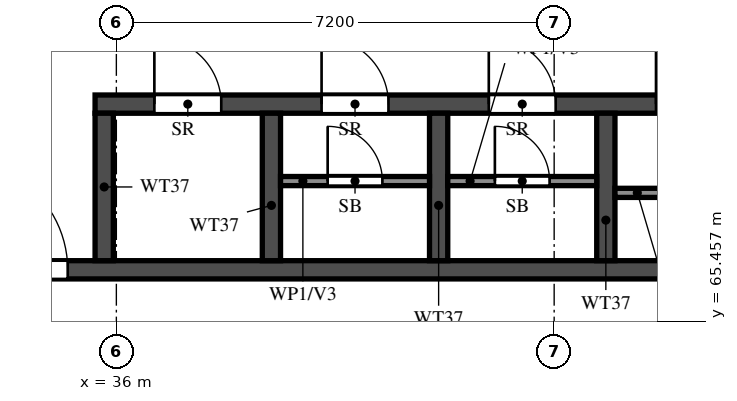
"""IFC4 building model, lengths in metres.
Left out: names, types, materials, properties, quantities, classifications, styles, units other than length and angle.
Written with IfcOpenShell. Run it as: python <this file> out.ifc"""

import sys

from ifc_helpers import new_model, si_unit, direction, frame, frame_2d, origin, place, context, subcontext, project, spatial, rectangle, extrude, element, fill, save


model = new_model("IFC4")
c1 = context("Model", 3, precision=1e-05, world=origin(), true_north=direction((0.0, 1.0)))
c2 = subcontext(c1, "Body", "Model", "MODEL_VIEW")
j1 = project(units=[si_unit("LENGTHUNIT", "METRE"), si_unit("PLANEANGLEUNIT", "RADIAN")], contexts=[c1])
p1 = place(None, origin())
s1 = spatial("IfcSite", under=j1, at=p1, CompositionType="ELEMENT")
p2 = place(p1, origin())
s2 = spatial("IfcBuilding", under=s1, at=p2, CompositionType="ELEMENT")
p3 = place(p2, frame((0.0, 0.0, 253.5)))
s3 = spatial("IfcBuildingStorey", under=s2, at=p3, CompositionType="ELEMENT", Elevation=253.5)
p4 = place(p3, frame((29.2, 66.3, 0.0), z_axis=(0.0, 0.0, 1.0), x_axis=(1.0, 0.0, 0.0)))
e1 = element("IfcWall", 1, at=p4, inside=s3, PredefinedType="SHEAR", context=c2, shape_type="SweptSolid", body=[
    extrude(rectangle(XDim=42.4, YDim=0.3, at=frame_2d((21.2, 0.0))), origin(), (0.0, 0.0, 1.0), 3.22),
])
p5 = place(p4, frame((1.425, 0.0, 0.0)))
e2 = element("IfcOpeningElement", 2, at=p5, cuts=e1, PredefinedType="OPENING", context=c2, shape_type="SweptSolid", body=[
    extrude(rectangle(XDim=1.1, YDim=2.1, at=frame_2d((0.55, 1.05))), frame((0.0, 0.16, 0.0), z_axis=(0.0, -1.0, 0.0), x_axis=(1.0, 0.0, 0.0)), (0.0, 0.0, 1.0), 0.32),
])
p6 = place(p4, frame((4.2, 0.0, 0.0)))
e3 = element("IfcOpeningElement", 3, at=p6, cuts=e1, PredefinedType="OPENING", context=c2, shape_type="SweptSolid", body=[
    extrude(rectangle(XDim=1.8, YDim=2.1, at=frame_2d((0.9, 1.05))), frame((0.0, 0.16, 0.0), z_axis=(0.0, -1.0, 0.0), x_axis=(1.0, 0.0, 0.0)), (0.0, 0.0, 1.0), 0.32),
])
p7 = place(p3, frame((35.65, 69.025, 0.0), z_axis=(0.0, 0.0, 1.0), x_axis=(1.0, 0.0, 0.0)))
e4 = element("IfcWall", 4, at=p7, inside=s3, PredefinedType="SHEAR", context=c2, shape_type="SweptSolid", body=[
    extrude(rectangle(XDim=24.05, YDim=0.3, at=frame_2d((12.025, 0.0))), origin(), (0.0, 0.0, 1.0), 3.22),
])
p8 = place(p7, frame((0.975, 0.0, 0.0)))
e5 = element("IfcOpeningElement", 5, at=p8, cuts=e4, PredefinedType="OPENING", context=c2, shape_type="SweptSolid", body=[
    extrude(rectangle(XDim=1.1, YDim=2.1, at=frame_2d((0.55, 1.05))), frame((0.0, 0.16, 0.0), z_axis=(0.0, -1.0, 0.0), x_axis=(1.0, 0.0, 0.0)), (0.0, 0.0, 1.0), 0.32),
])
p9 = place(p7, frame((3.725, 0.0, 0.0)))
e6 = element("IfcOpeningElement", 6, at=p9, cuts=e4, PredefinedType="OPENING", context=c2, shape_type="SweptSolid", body=[
    extrude(rectangle(XDim=1.1, YDim=2.1, at=frame_2d((0.55, 1.05))), frame((0.0, 0.16, 0.0), z_axis=(0.0, -1.0, 0.0), x_axis=(1.0, 0.0, 0.0)), (0.0, 0.0, 1.0), 0.32),
])
p10 = place(p7, frame((6.475, 0.0, 0.0)))
e7 = element("IfcOpeningElement", 7, at=p10, cuts=e4, PredefinedType="OPENING", context=c2, shape_type="SweptSolid", body=[
    extrude(rectangle(XDim=1.1, YDim=2.1, at=frame_2d((0.55, 1.05))), frame((0.0, 0.16, 0.0), z_axis=(0.0, -1.0, 0.0), x_axis=(1.0, 0.0, 0.0)), (0.0, 0.0, 1.0), 0.32),
])
p11 = place(p7, frame((9.225, 0.0, 0.0)))
e8 = element("IfcOpeningElement", 8, at=p11, cuts=e4, PredefinedType="OPENING", context=c2, shape_type="SweptSolid", body=[
    extrude(rectangle(XDim=1.1, YDim=2.1, at=frame_2d((0.55, 1.05))), frame((0.0, 0.16, 0.0), z_axis=(0.0, -1.0, 0.0), x_axis=(1.0, 0.0, 0.0)), (0.0, 0.0, 1.0), 0.32),
])
p12 = place(p7, frame((11.975, 0.0, 0.0)))
e9 = element("IfcOpeningElement", 9, at=p12, cuts=e4, PredefinedType="OPENING", context=c2, shape_type="SweptSolid", body=[
    extrude(rectangle(XDim=1.1, YDim=2.1, at=frame_2d((0.55, 1.05))), frame((0.0, 0.16, 0.0), z_axis=(0.0, -1.0, 0.0), x_axis=(1.0, 0.0, 0.0)), (0.0, 0.0, 1.0), 0.32),
])
p13 = place(p7, frame((14.725, 0.0, 0.0)))
e10 = element("IfcOpeningElement", 10, at=p13, cuts=e4, PredefinedType="OPENING", context=c2, shape_type="SweptSolid", body=[
    extrude(rectangle(XDim=1.1, YDim=2.1, at=frame_2d((0.55, 1.05))), frame((0.0, 0.16, 0.0), z_axis=(0.0, -1.0, 0.0), x_axis=(1.0, 0.0, 0.0)), (0.0, 0.0, 1.0), 0.32),
])
p14 = place(p7, frame((17.6, 0.0, 0.0)))
e11 = element("IfcOpeningElement", 11, at=p14, cuts=e4, PredefinedType="OPENING", context=c2, shape_type="SweptSolid", body=[
    extrude(rectangle(XDim=1.1, YDim=2.1, at=frame_2d((0.55, 1.05))), frame((0.0, 0.16, 0.0), z_axis=(0.0, -1.0, 0.0), x_axis=(1.0, 0.0, 0.0)), (0.0, 0.0, 1.0), 0.32),
])
p15 = place(p7, frame((20.6, 0.0, 0.0)))
e12 = element("IfcOpeningElement", 12, at=p15, cuts=e4, PredefinedType="OPENING", context=c2, shape_type="SweptSolid", body=[
    extrude(rectangle(XDim=1.1, YDim=2.1, at=frame_2d((0.55, 1.05))), frame((0.0, 0.16, 0.0), z_axis=(0.0, -1.0, 0.0), x_axis=(1.0, 0.0, 0.0)), (0.0, 0.0, 1.0), 0.32),
])
for number, where, z_axis, x_axis in (
    (13, (35.8, 66.45, 0.0), (0.0, 0.0, 1.0), (0.0, 1.0, 0.0)),
    (14, (38.55, 66.45, 0.0), (0.0, 0.0, 1.0), (0.0, 1.0, 0.0)),
    (15, (41.3, 66.45, 0.0), (0.0, 0.0, 1.0), (0.0, 1.0, 0.0)),
    (16, (44.05, 66.45, 0.0), (0.0, 0.0, 1.0), (0.0, 1.0, 0.0)),
):
    element("IfcWall", number, at=place(p3, frame(where, z_axis=z_axis, x_axis=x_axis)), inside=s3, PredefinedType="SHEAR", context=c2, shape_type="SweptSolid", body=[
        extrude(rectangle(XDim=2.425, YDim=0.3, at=frame_2d((1.212, 0.0))), origin(), (0.0, 0.0, 1.0), 3.22),
    ])
p16 = place(p3, frame((38.7, 67.76, 0.0), z_axis=(0.0, 0.0, 1.0), x_axis=(1.0, 0.0, 0.0)))
e17 = element("IfcWall", 17, at=p16, inside=s3, PredefinedType="PARTITIONING", context=c2, shape_type="SweptSolid", body=[
    extrude(rectangle(XDim=2.45, YDim=0.15, at=frame_2d((1.225, 0.0))), origin(), (0.0, 0.0, 1.0), 3.22),
])
p17 = place(p16, frame((0.775, 0.0, 0.0)))
e18 = element("IfcOpeningElement", 18, at=p17, cuts=e17, PredefinedType="OPENING", context=c2, shape_type="SweptSolid", body=[
    extrude(rectangle(XDim=0.9, YDim=2.1, at=frame_2d((0.45, 1.05))), frame((0.0, 0.085, 0.0), z_axis=(0.0, -1.0, 0.0), x_axis=(1.0, 0.0, 0.0)), (0.0, 0.0, 1.0), 0.17),
])
p18 = place(p3, frame((41.45, 67.76, 0.0), z_axis=(0.0, 0.0, 1.0), x_axis=(1.0, 0.0, 0.0)))
e19 = element("IfcWall", 19, at=p18, inside=s3, PredefinedType="PARTITIONING", context=c2, shape_type="SweptSolid", body=[
    extrude(rectangle(XDim=2.45, YDim=0.15, at=frame_2d((1.225, 0.0))), origin(), (0.0, 0.0, 1.0), 3.22),
])
p19 = place(p18, frame((0.775, 0.0, 0.0)))
e20 = element("IfcOpeningElement", 20, at=p19, cuts=e19, PredefinedType="OPENING", context=c2, shape_type="SweptSolid", body=[
    extrude(rectangle(XDim=0.9, YDim=2.1, at=frame_2d((0.45, 1.05))), frame((0.0, 0.085, 0.0), z_axis=(0.0, -1.0, 0.0), x_axis=(1.0, 0.0, 0.0)), (0.0, 0.0, 1.0), 0.17),
])
p20 = place(p3, frame((44.2, 67.565, 0.0), z_axis=(0.0, 0.0, 1.0), x_axis=(1.0, 0.0, 0.0)))
e21 = element("IfcWall", 21, at=p20, inside=s3, PredefinedType="PARTITIONING", context=c2, shape_type="SweptSolid", body=[
    extrude(rectangle(XDim=2.45, YDim=0.15, at=frame_2d((1.225, 0.0))), origin(), (0.0, 0.0, 1.0), 3.22),
])
p21 = place(p20, frame((0.775, 0.0, 0.0)))
e22 = element("IfcOpeningElement", 22, at=p21, cuts=e21, PredefinedType="OPENING", context=c2, shape_type="SweptSolid", body=[
    extrude(rectangle(XDim=0.9, YDim=2.1, at=frame_2d((0.45, 1.05))), frame((0.0, 0.085, 0.0), z_axis=(0.0, -1.0, 0.0), x_axis=(1.0, 0.0, 0.0)), (0.0, 0.0, 1.0), 0.17),
])
p22 = place(p6, origin())
e23 = element("IfcDoor", 23, at=p22, inside=s3, OperationType="DOUBLE_DOOR_SINGLE_SWING", PredefinedType="DOOR", context=c2, shape_type="SweptSolid", body=[
    extrude(rectangle(XDim=1.8, YDim=2.1, at=frame_2d((0.9, 1.05))), frame((0.0, 0.025, 0.0), z_axis=(0.0, -1.0, 0.0), x_axis=(1.0, 0.0, 0.0)), (0.0, 0.0, 1.0), 0.05),
])
fill(e3, e23)
p23 = place(p8, origin())
e24 = element("IfcDoor", 24, at=p23, inside=s3, OperationType="SINGLE_SWING_RIGHT", PredefinedType="DOOR", context=c2, shape_type="SweptSolid", body=[
    extrude(rectangle(XDim=1.1, YDim=2.1, at=frame_2d((0.55, 1.05))), frame((0.0, 0.025, 0.0), z_axis=(0.0, -1.0, 0.0), x_axis=(1.0, 0.0, 0.0)), (0.0, 0.0, 1.0), 0.05),
])
fill(e5, e24)
p24 = place(p9, origin())
e25 = element("IfcDoor", 25, at=p24, inside=s3, OperationType="SINGLE_SWING_LEFT", PredefinedType="DOOR", context=c2, shape_type="SweptSolid", body=[
    extrude(rectangle(XDim=1.1, YDim=2.1, at=frame_2d((0.55, 1.05))), frame((0.0, 0.025, 0.0), z_axis=(0.0, -1.0, 0.0), x_axis=(1.0, 0.0, 0.0)), (0.0, 0.0, 1.0), 0.05),
])
fill(e6, e25)
p25 = place(p17, origin())
e26 = element("IfcDoor", 26, at=p25, inside=s3, OperationType="SINGLE_SWING_RIGHT", PredefinedType="DOOR", context=c2, shape_type="SweptSolid", body=[
    extrude(rectangle(XDim=0.9, YDim=2.1, at=frame_2d((0.45, 1.05))), frame((0.0, 0.025, 0.0), z_axis=(0.0, -1.0, 0.0), x_axis=(1.0, 0.0, 0.0)), (0.0, 0.0, 1.0), 0.05),
])
fill(e18, e26)
p26 = place(p10, origin())
e27 = element("IfcDoor", 27, at=p26, inside=s3, OperationType="SINGLE_SWING_RIGHT", PredefinedType="DOOR", context=c2, shape_type="SweptSolid", body=[
    extrude(rectangle(XDim=1.1, YDim=2.1, at=frame_2d((0.55, 1.05))), frame((0.0, 0.025, 0.0), z_axis=(0.0, -1.0, 0.0), x_axis=(1.0, 0.0, 0.0)), (0.0, 0.0, 1.0), 0.05),
])
fill(e7, e27)
p27 = place(p19, origin())
e28 = element("IfcDoor", 28, at=p27, inside=s3, OperationType="SINGLE_SWING_LEFT", PredefinedType="DOOR", context=c2, shape_type="SweptSolid", body=[
    extrude(rectangle(XDim=0.9, YDim=2.1, at=frame_2d((0.45, 1.05))), frame((0.0, 0.025, 0.0), z_axis=(0.0, -1.0, 0.0), x_axis=(1.0, 0.0, 0.0)), (0.0, 0.0, 1.0), 0.05),
])
fill(e20, e28)
p28 = place(p11, origin())
e29 = element("IfcDoor", 29, at=p28, inside=s3, OperationType="SINGLE_SWING_LEFT", PredefinedType="DOOR", context=c2, shape_type="SweptSolid", body=[
    extrude(rectangle(XDim=1.1, YDim=2.1, at=frame_2d((0.55, 1.05))), frame((0.0, 0.025, 0.0), z_axis=(0.0, -1.0, 0.0), x_axis=(1.0, 0.0, 0.0)), (0.0, 0.0, 1.0), 0.05),
])
fill(e8, e29)
save(model, sys.argv[1])
